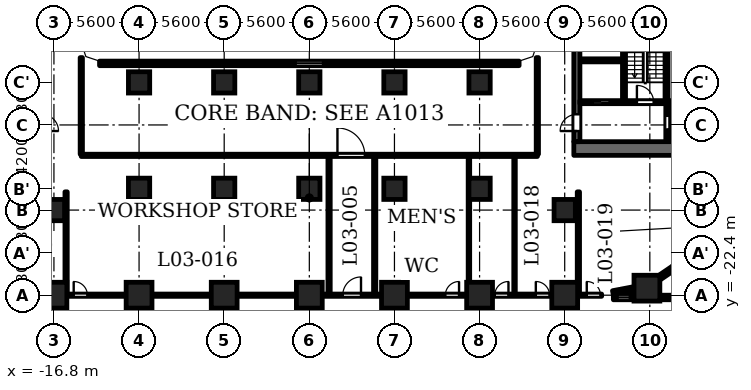
"""IFC4 building model, lengths in metres.
Left out: names, types, materials, properties, quantities, classifications, styles, units other than length and angle.
Written with IfcOpenShell. Run it as: python <this file> out.ifc"""

import sys

from ifc_helpers import new_model, si_unit, direction, frame, frame_2d, origin, origin_2d, place, context, subcontext, project, spatial, polyline, rectangle, outline, extrude, element, fill, save


model = new_model("IFC4")
c1 = context("Model", 3, precision=1e-05, world=origin(), true_north=direction((0.0, 1.0)))
c2 = subcontext(c1, "Body", "Model", "MODEL_VIEW")
j1 = project(units=[si_unit("LENGTHUNIT", "METRE"), si_unit("PLANEANGLEUNIT", "RADIAN")], contexts=[c1])
p1 = place(None, origin())
s1 = spatial("IfcSite", under=j1, at=p1, CompositionType="ELEMENT")
p2 = place(p1, origin())
s2 = spatial("IfcBuilding", under=s1, at=p2, CompositionType="ELEMENT")
p3 = place(p2, frame((0.0, 0.0, 16.1)))
s3 = spatial("IfcBuildingStorey", under=s2, at=p3, CompositionType="ELEMENT", Elevation=16.1)
for number, where, z_axis, x_axis in (
    (1, (-16.8, -22.4, 0.0), (0.0, 0.0, 1.0), (1.0, 0.0, 0.0)),
    (2, (-11.2, -22.4, 0.0), (0.0, 0.0, 1.0), (1.0, 0.0, 0.0)),
    (3, (-5.6, -22.4, 0.0), (0.0, 0.0, 1.0), (1.0, 0.0, 0.0)),
    (4, (0.0, -22.4, 0.0), (0.0, 0.0, 1.0), (1.0, 0.0, 0.0)),
    (5, (5.6, -22.4, 0.0), (0.0, 0.0, 1.0), (1.0, 0.0, 0.0)),
    (6, (11.2, -22.4, 0.0), (0.0, 0.0, 1.0), (1.0, 0.0, 0.0)),
    (7, (16.8, -22.4, 0.0), (0.0, 0.0, 1.0), (1.0, 0.0, 0.0)),
    (8, (22.209, -21.938, 0.0), (0.0, 0.0, 1.0), (1.0, 0.0, 0.0)),
):
    element("IfcColumn", number, at=place(p3, frame(where, z_axis=z_axis, x_axis=x_axis)), inside=s3, PredefinedType="COLUMN", context=c2, shape_type="SweptSolid", body=[
        extrude(rectangle(XDim=1.7, YDim=1.7, at=origin_2d()), origin(), (0.0, 0.0, 1.0), 4.8),
    ])
for number, where, z_axis, x_axis in (
    (9, (-16.8, -16.8, 0.0), (0.0, 0.0, 1.0), (1.0, 0.0, 0.0)),
    (10, (-11.2, -8.4, 0.0), (0.0, 0.0, 1.0), (1.0, 0.0, 0.0)),
    (11, (-5.6, -8.4, 0.0), (0.0, 0.0, 1.0), (1.0, 0.0, 0.0)),
    (12, (0.0, -8.4, 0.0), (0.0, 0.0, 1.0), (1.0, 0.0, 0.0)),
    (13, (5.6, -8.4, 0.0), (0.0, 0.0, 1.0), (1.0, 0.0, 0.0)),
    (14, (11.2, -8.4, 0.0), (0.0, 0.0, 1.0), (1.0, 0.0, 0.0)),
    (15, (16.8, -16.8, 0.0), (0.0, 0.0, 1.0), (1.0, 0.0, 0.0)),
    (16, (-11.2, -15.4, 0.0), (0.0, 0.0, 1.0), (1.0, 0.0, 0.0)),
    (17, (-5.6, -15.4, 0.0), (0.0, 0.0, 1.0), (1.0, 0.0, 0.0)),
    (18, (0.0, -15.4, 0.0), (0.0, 0.0, 1.0), (1.0, 0.0, 0.0)),
    (19, (5.6, -15.4, 0.0), (0.0, 0.0, 1.0), (1.0, 0.0, 0.0)),
    (20, (11.2, -15.4, 0.0), (0.0, 0.0, 1.0), (1.0, 0.0, 0.0)),
):
    element("IfcColumn", number, at=place(p3, frame(where, z_axis=z_axis, x_axis=x_axis)), inside=s3, PredefinedType="COLUMN", context=c2, shape_type="SweptSolid", body=[
        extrude(rectangle(XDim=1.4, YDim=1.4, at=origin_2d()), origin(), (0.0, 0.0, 1.0), 4.8),
    ])
p4 = place(p3, frame((27.5, -22.55, 0.0), z_axis=(0.0, 0.0, 1.0), x_axis=(-1.0, 0.0, 0.0)))
e21 = element("IfcWall", 21, at=p4, inside=s3, PredefinedType="SOLIDWALL", context=c2, shape_type="SweptSolid", body=[
    extrude(rectangle(XDim=4.441, YDim=0.3, at=frame_2d((2.221, 0.0))), origin(), (0.0, 0.0, 1.0), 4.45),
])
p5 = place(p4, frame((0.921, 0.0, 0.9)))
e22 = element("IfcOpeningElement", 22, at=p5, cuts=e21, PredefinedType="OPENING", context=c2, shape_type="SweptSolid", body=[
    extrude(rectangle(XDim=2.6, YDim=1.25, at=frame_2d((1.3, 0.625))), frame((0.0, 0.16, 0.0), z_axis=(0.0, -1.0, 0.0), x_axis=(1.0, 0.0, 0.0)), (0.0, 0.0, 1.0), 0.32),
])
p6 = place(p3, frame((21.359, -22.55, 0.0), z_axis=(0.0, 0.0, 1.0), x_axis=(-1.0, 0.0, 0.0)))
e23 = element("IfcWall", 23, at=p6, inside=s3, PredefinedType="SOLIDWALL", context=c2, shape_type="SweptSolid", body=[
    extrude(rectangle(XDim=1.359, YDim=0.3, at=frame_2d((0.679, 0.0))), origin(), (0.0, 0.0, 1.0), 3.55),
])
p7 = place(p6, frame((0.279, 0.0, 0.6)))
e24 = element("IfcOpeningElement", 24, at=p7, cuts=e23, PredefinedType="OPENING", context=c2, shape_type="SweptSolid", body=[
    extrude(rectangle(XDim=0.8, YDim=1.55, at=frame_2d((0.4, 0.775))), frame((0.0, 0.16, 0.0), z_axis=(0.0, -1.0, 0.0), x_axis=(1.0, 0.0, 0.0)), (0.0, 0.0, 1.0), 0.32),
])
for number, where, z_axis, x_axis in (
    (25, (19.972, -22.253, 0.0), (0.0, 0.0, 1.0), (0.982, 0.187, 0.0)),
    (26, (22.85, -21.369, 0.0), (0.0, 0.0, 1.0), (0.827, 0.562, 0.0)),
):
    element("IfcWall", number, at=place(p3, frame(where, z_axis=z_axis, x_axis=x_axis)), inside=s3, PredefinedType="SOLIDWALL", context=c2, shape_type="SweptSolid", body=[
        extrude(rectangle(XDim=1.406, YDim=0.3, at=frame_2d((0.703, 0.0))), origin(), (0.0, 0.0, 1.0), 3.55),
    ])
p8 = place(p3, frame((13.8, -7.15, 0.0), z_axis=(0.0, 0.0, 1.0), x_axis=(-1.0, 0.0, 0.0)))
e27 = element("IfcWall", 27, at=p8, inside=s3, PredefinedType="SOLIDWALL", context=c2, shape_type="SweptSolid", body=[
    extrude(rectangle(XDim=27.6, YDim=0.3, at=frame_2d((13.8, 0.0))), origin(), (0.0, 0.0, 1.0), 4.45),
])
p9 = place(p8, frame((12.9, 0.0, 0.9)))
e28 = element("IfcOpeningElement", 28, at=p9, cuts=e27, PredefinedType="OPENING", context=c2, shape_type="SweptSolid", body=[
    extrude(rectangle(XDim=1.8, YDim=1.25, at=frame_2d((0.9, 0.625))), frame((0.0, 0.16, 0.0), z_axis=(0.0, -1.0, 0.0), x_axis=(1.0, 0.0, 0.0)), (0.0, 0.0, 1.0), 0.32),
])
p10 = place(p3, frame((20.7, -9.6, 0.0), z_axis=(0.0, 0.0, 1.0), x_axis=(0.0, 1.0, 0.0)))
e29 = element("IfcWall", 29, at=p10, inside=s3, PredefinedType="SHEAR", context=c2, shape_type="SweptSolid", body=[
    extrude(rectangle(XDim=9.75, YDim=0.2, at=frame_2d((4.875, 0.0))), origin(), (0.0, 0.0, 1.0), 4.45),
])
p11 = place(p3, frame((17.4, -12.75, 0.0), z_axis=(0.0, 0.0, 1.0), x_axis=(1.0, 0.0, 0.0)))
e30 = element("IfcWall", 30, at=p11, inside=s3, PredefinedType="SHEAR", context=c2, shape_type="SweptSolid", body=[
    extrude(rectangle(XDim=10.4, YDim=0.9, at=frame_2d((5.2, 0.0))), origin(), (0.0, 0.0, 1.0), 4.45),
])
p12 = place(p3, frame((17.6, -12.3, 0.0), z_axis=(0.0, 0.0, 1.0), x_axis=(0.0, 1.0, 0.0)))
e31 = element("IfcWall", 31, at=p12, inside=s3, PredefinedType="SHEAR", context=c2, shape_type="SweptSolid", body=[
    extrude(rectangle(XDim=24.6, YDim=0.4, at=frame_2d((12.3, 0.0))), origin(), (0.0, 0.0, 1.0), 4.45),
])
p13 = place(p12, frame((6.0, 0.0, 0.0)))
e32 = element("IfcOpeningElement", 32, at=p13, cuts=e31, PredefinedType="OPENING", context=c2, shape_type="SweptSolid", body=[
    extrude(rectangle(XDim=1.1, YDim=2.1, at=frame_2d((0.55, 1.05))), frame((0.0, 0.21, 0.0), z_axis=(0.0, -1.0, 0.0), x_axis=(1.0, 0.0, 0.0)), (0.0, 0.0, 1.0), 0.42),
])
p14 = place(p12, frame((8.4, 0.0, 0.0)))
e33 = element("IfcOpeningElement", 33, at=p14, cuts=e31, PredefinedType="OPENING", context=c2, shape_type="SweptSolid", body=[
    extrude(rectangle(XDim=1.1, YDim=2.1, at=frame_2d((0.55, 1.05))), frame((0.0, 0.21, 0.0), z_axis=(0.0, -1.0, 0.0), x_axis=(1.0, 0.0, 0.0)), (0.0, 0.0, 1.0), 0.42),
])
p15 = place(p12, frame((10.8, 0.0, 0.0)))
e34 = element("IfcOpeningElement", 34, at=p15, cuts=e31, PredefinedType="OPENING", context=c2, shape_type="SweptSolid", body=[
    extrude(rectangle(XDim=1.1, YDim=2.1, at=frame_2d((0.55, 1.05))), frame((0.0, 0.21, 0.0), z_axis=(0.0, -1.0, 0.0), x_axis=(1.0, 0.0, 0.0)), (0.0, 0.0, 1.0), 0.42),
])
p16 = place(p12, frame((16.75, 0.0, 0.0)))
e35 = element("IfcOpeningElement", 35, at=p16, cuts=e31, PredefinedType="OPENING", context=c2, shape_type="SweptSolid", body=[
    extrude(rectangle(XDim=0.9, YDim=2.1, at=frame_2d((0.45, 1.05))), frame((0.0, 0.21, 0.0), z_axis=(0.0, -1.0, 0.0), x_axis=(1.0, 0.0, 0.0)), (0.0, 0.0, 1.0), 0.42),
])
p17 = place(p12, frame((22.8, 0.0, 0.0)))
e36 = element("IfcOpeningElement", 36, at=p17, cuts=e31, PredefinedType="OPENING", context=c2, shape_type="SweptSolid", body=[
    extrude(rectangle(XDim=1.1, YDim=2.1, at=frame_2d((0.55, 1.05))), frame((0.0, 0.21, 0.0), z_axis=(0.0, -1.0, 0.0), x_axis=(1.0, 0.0, 0.0)), (0.0, 0.0, 1.0), 0.42),
])
p18 = place(p12, frame((0.7, 0.0, 0.0)))
e37 = element("IfcOpeningElement", 37, at=p18, cuts=e31, PredefinedType="OPENING", context=c2, shape_type="SweptSolid", body=[
    extrude(rectangle(XDim=1.1, YDim=2.1, at=frame_2d((0.55, 1.05))), frame((0.0, 0.21, 0.0), z_axis=(0.0, -1.0, 0.0), x_axis=(1.0, 0.0, 0.0)), (0.0, 0.0, 1.0), 0.42),
])
p19 = place(p12, frame((12.775, 0.0, 0.0)))
e38 = element("IfcOpeningElement", 38, at=p19, cuts=e31, PredefinedType="OPENING", context=c2, shape_type="SweptSolid", body=[
    extrude(rectangle(XDim=1.8, YDim=2.1, at=frame_2d((0.9, 1.05))), frame((0.0, 0.21, 0.0), z_axis=(0.0, -1.0, 0.0), x_axis=(1.0, 0.0, 0.0)), (0.0, 0.0, 1.0), 0.42),
])
p20 = place(p3, frame((23.55, -12.3, 0.0), z_axis=(0.0, 0.0, 1.0), x_axis=(0.0, 1.0, 0.0)))
e39 = element("IfcWall", 39, at=p20, inside=s3, PredefinedType="PARTITIONING", context=c2, shape_type="SweptSolid", body=[
    extrude(rectangle(XDim=2.5, YDim=0.2, at=frame_2d((1.25, 0.0))), origin(), (0.0, 0.0, 1.0), 4.45),
])
p21 = place(p20, frame((0.8, 0.0, 0.0)))
e40 = element("IfcOpeningElement", 40, at=p21, cuts=e39, PredefinedType="OPENING", context=c2, shape_type="SweptSolid", body=[
    extrude(rectangle(XDim=0.9, YDim=2.1, at=frame_2d((0.45, 1.05))), frame((0.0, 0.11, 0.0), z_axis=(0.0, -1.0, 0.0), x_axis=(1.0, 0.0, 0.0)), (0.0, 0.0, 1.0), 0.22),
])
p22 = place(p3, frame((17.8, -9.7, 0.0), z_axis=(0.0, 0.0, 1.0), x_axis=(1.0, 0.0, 0.0)))
e41 = element("IfcWall", 41, at=p22, inside=s3, PredefinedType="SHEAR", context=c2, shape_type="SweptSolid", body=[
    extrude(rectangle(XDim=8.3, YDim=0.2, at=frame_2d((4.15, 0.0))), origin(), (0.0, 0.0, 1.0), 4.45),
])
p23 = place(p22, frame((0.85, 0.0, 0.0)))
e42 = element("IfcOpeningElement", 42, at=p23, cuts=e41, PredefinedType="OPENING", context=c2, shape_type="SweptSolid", body=[
    extrude(rectangle(XDim=1.1, YDim=2.1, at=frame_2d((0.55, 1.05))), frame((0.0, 0.11, 0.0), z_axis=(0.0, -1.0, 0.0), x_axis=(1.0, 0.0, 0.0)), (0.0, 0.0, 1.0), 0.22),
])
p24 = place(p22, frame((3.75, 0.0, 0.0)))
e43 = element("IfcOpeningElement", 43, at=p24, cuts=e41, PredefinedType="OPENING", context=c2, shape_type="SweptSolid", body=[
    extrude(rectangle(XDim=1.1, YDim=2.1, at=frame_2d((0.55, 1.05))), frame((0.0, 0.11, 0.0), z_axis=(0.0, -1.0, 0.0), x_axis=(1.0, 0.0, 0.0)), (0.0, 0.0, 1.0), 0.22),
])
p25 = place(p3, frame((17.8, -6.95, 0.0), z_axis=(0.0, 0.0, 1.0), x_axis=(1.0, 0.0, 0.0)))
e44 = element("IfcWall", 44, at=p25, inside=s3, PredefinedType="PARTITIONING", context=c2, shape_type="SweptSolid", body=[
    extrude(rectangle(XDim=2.8, YDim=0.2, at=frame_2d((1.4, 0.0))), origin(), (0.0, 0.0, 1.0), 4.45),
])
p26 = place(p3, frame((23.5, -9.6, 0.0), z_axis=(0.0, 0.0, 1.0), x_axis=(0.0, 1.0, 0.0)))
e45 = element("IfcWall", 45, at=p26, inside=s3, PredefinedType="SHEAR", context=c2, shape_type="SweptSolid", body=[
    extrude(rectangle(XDim=6.9, YDim=0.2, at=frame_2d((3.45, 0.0))), origin(), (0.0, 0.0, 1.0), 4.45),
])
p27 = place(p3, frame((-18.98, -22.4, 0.0), z_axis=(0.0, 0.0, 1.0), x_axis=(1.0, 0.0, 0.0)))
e46 = element("IfcWall", 46, at=p27, inside=s3, PredefinedType="PARTITIONING", context=c2, shape_type="SweptSolid", body=[
    extrude(rectangle(XDim=38.211, YDim=0.15, at=frame_2d((19.105, 0.0))), origin(), (0.0, 0.0, 1.0), 3.55),
])
p28 = place(p27, frame((21.18, 0.0, 0.0)))
e47 = element("IfcOpeningElement", 47, at=p28, cuts=e46, PredefinedType="OPENING", context=c2, shape_type="SweptSolid", body=[
    extrude(rectangle(XDim=1.2, YDim=2.1, at=frame_2d((0.6, 1.05))), frame((0.0, 0.085, 0.0), z_axis=(0.0, -1.0, 0.0), x_axis=(1.0, 0.0, 0.0)), (0.0, 0.0, 1.0), 0.17),
])
p29 = place(p27, frame((0.08, 0.0, 0.0)))
e48 = element("IfcOpeningElement", 48, at=p29, cuts=e46, PredefinedType="OPENING", context=c2, shape_type="SweptSolid", body=[
    extrude(rectangle(XDim=1.0, YDim=2.1, at=frame_2d((0.5, 1.05))), frame((0.0, 0.085, 0.0), z_axis=(0.0, -1.0, 0.0), x_axis=(1.0, 0.0, 0.0)), (0.0, 0.0, 1.0), 0.17),
])
p30 = place(p27, frame((3.48, 0.0, 0.0)))
e49 = element("IfcOpeningElement", 49, at=p30, cuts=e46, PredefinedType="OPENING", context=c2, shape_type="SweptSolid", body=[
    extrude(rectangle(XDim=0.9, YDim=2.1, at=frame_2d((0.45, 1.05))), frame((0.0, 0.085, 0.0), z_axis=(0.0, -1.0, 0.0), x_axis=(1.0, 0.0, 0.0)), (0.0, 0.0, 1.0), 0.17),
])
p31 = place(p27, frame((27.93, 0.0, 0.0)))
e50 = element("IfcOpeningElement", 50, at=p31, cuts=e46, PredefinedType="OPENING", context=c2, shape_type="SweptSolid", body=[
    extrude(rectangle(XDim=0.9, YDim=2.1, at=frame_2d((0.45, 1.05))), frame((0.0, 0.085, 0.0), z_axis=(0.0, -1.0, 0.0), x_axis=(1.0, 0.0, 0.0)), (0.0, 0.0, 1.0), 0.17),
])
p32 = place(p27, frame((31.18, 0.0, 0.0)))
e51 = element("IfcOpeningElement", 51, at=p32, cuts=e46, PredefinedType="OPENING", context=c2, shape_type="SweptSolid", body=[
    extrude(rectangle(XDim=0.9, YDim=2.1, at=frame_2d((0.45, 1.05))), frame((0.0, 0.085, 0.0), z_axis=(0.0, -1.0, 0.0), x_axis=(1.0, 0.0, 0.0)), (0.0, 0.0, 1.0), 0.17),
])
p33 = place(p27, frame((33.88, 0.0, 0.0)))
e52 = element("IfcOpeningElement", 52, at=p33, cuts=e46, PredefinedType="OPENING", context=c2, shape_type="SweptSolid", body=[
    extrude(rectangle(XDim=0.9, YDim=2.1, at=frame_2d((0.45, 1.05))), frame((0.0, 0.085, 0.0), z_axis=(0.0, -1.0, 0.0), x_axis=(1.0, 0.0, 0.0)), (0.0, 0.0, 1.0), 0.17),
])
p34 = place(p27, frame((37.231, 0.0, 0.0)))
e53 = element("IfcOpeningElement", 53, at=p34, cuts=e46, PredefinedType="OPENING", context=c2, shape_type="SweptSolid", body=[
    extrude(rectangle(XDim=0.9, YDim=2.1, at=frame_2d((0.45, 1.05))), frame((0.0, 0.085, 0.0), z_axis=(0.0, -1.0, 0.0), x_axis=(1.0, 0.0, 0.0)), (0.0, 0.0, 1.0), 0.17),
])
p35 = place(p3, frame((-15.005, -13.2, 0.0), z_axis=(0.0, 0.0, 1.0), x_axis=(1.0, 0.0, 0.0)))
e54 = element("IfcWall", 54, at=p35, inside=s3, PredefinedType="PARTITIONING", context=c2, shape_type="SweptSolid", body=[
    extrude(rectangle(XDim=30.01, YDim=0.15, at=frame_2d((15.005, 0.0))), origin(), (0.0, 0.0, 1.0), 4.45),
])
p36 = place(p35, frame((16.855, 0.0, 0.0)))
e55 = element("IfcOpeningElement", 55, at=p36, cuts=e54, PredefinedType="OPENING", context=c2, shape_type="SweptSolid", body=[
    extrude(rectangle(XDim=1.8, YDim=2.1, at=frame_2d((0.9, 1.05))), frame((0.0, 0.085, 0.0), z_axis=(0.0, -1.0, 0.0), x_axis=(1.0, 0.0, 0.0)), (0.0, 0.0, 1.0), 0.17),
])
p37 = place(p3, frame((-16.0, -22.325, 0.0), z_axis=(0.0, 0.0, 1.0), x_axis=(0.0, 1.0, 0.0)))
e56 = element("IfcWall", 56, at=p37, inside=s3, PredefinedType="PARTITIONING", context=c2, shape_type="SweptSolid", body=[
    extrude(rectangle(XDim=6.725, YDim=0.15, at=frame_2d((3.362, 0.0))), origin(), (0.0, 0.0, 1.0), 4.45),
])
p38 = place(p3, frame((-15.0, -13.125, 0.0), z_axis=(0.0, 0.0, 1.0), x_axis=(0.0, 1.0, 0.0)))
e57 = element("IfcWall", 57, at=p38, inside=s3, PredefinedType="PARTITIONING", context=c2, shape_type="SweptSolid", body=[
    extrude(rectangle(XDim=6.356, YDim=0.15, at=frame_2d((3.178, 0.0))), origin(), (0.0, 0.0, 1.0), 4.45),
])
for number, where, z_axis, x_axis in (
    (58, (1.3, -22.325, 0.0), (0.0, 0.0, 1.0), (0.0, 1.0, 0.0)),
    (59, (4.3, -22.325, 0.0), (0.0, 0.0, 1.0), (0.0, 1.0, 0.0)),
):
    element("IfcWall", number, at=place(p3, frame(where, z_axis=z_axis, x_axis=x_axis)), inside=s3, PredefinedType="PARTITIONING", context=c2, shape_type="SweptSolid", body=[
        extrude(rectangle(XDim=9.05, YDim=0.15, at=frame_2d((4.525, 0.0))), origin(), (0.0, 0.0, 1.0), 4.45),
    ])
for number, where, z_axis, x_axis in (
    (60, (10.5, -22.325, 0.0), (0.0, 0.0, 1.0), (0.0, 1.0, 0.0)),
    (61, (13.5, -22.325, 0.0), (0.0, 0.0, 1.0), (0.0, 1.0, 0.0)),
):
    element("IfcWall", number, at=place(p3, frame(where, z_axis=z_axis, x_axis=x_axis)), inside=s3, PredefinedType="PARTITIONING", context=c2, shape_type="SweptSolid", body=[
        extrude(rectangle(XDim=9.05, YDim=0.1, at=frame_2d((4.525, 0.0))), origin(), (0.0, 0.0, 1.0), 4.45),
    ])
p39 = place(p3, frame((15.0, -13.125, 0.0), z_axis=(0.0, 0.0, 1.0), x_axis=(0.0, 1.0, 0.0)))
e62 = element("IfcWall", 62, at=p39, inside=s3, PredefinedType="PARTITIONING", context=c2, shape_type="SweptSolid", body=[
    extrude(rectangle(XDim=6.356, YDim=0.15, at=frame_2d((3.178, 0.0))), origin(), (0.0, 0.0, 1.0), 4.45),
])
p40 = place(p3, frame((17.7, -22.325, 0.0), z_axis=(0.0, 0.0, 1.0), x_axis=(0.0, 1.0, 0.0)))
e63 = element("IfcWall", 63, at=p40, inside=s3, PredefinedType="PARTITIONING", context=c2, shape_type="SweptSolid", body=[
    extrude(rectangle(XDim=6.725, YDim=0.15, at=frame_2d((3.362, 0.0))), origin(), (0.0, 0.0, 1.0), 4.45),
])
p41 = place(p3, origin())
e64 = element("IfcWall", 64, at=p41, inside=s3, PredefinedType="SOLIDWALL", context=c2, shape_type="SweptSolid", body=[
    extrude(outline(polyline([(19.944, -22.105), (19.251, -22.238), (19.251, -22.7), (20.0, -22.7), (20.0, -22.4), (19.944, -22.105)])), origin(), (0.0, 0.0, 1.0), 3.55),
])
e65 = element("IfcWall", 65, at=p41, inside=s3, PredefinedType="SOLIDWALL", context=c2, shape_type="SweptSolid", body=[
    extrude(outline(polyline([(14.937, -6.937), (15.3, -5.849), (15.3, -5.8), (15.0, -5.8), (14.7, -6.7), (13.8, -7.0), (13.8, -7.3), (13.849, -7.3), (14.937, -6.937)])), origin(), (0.0, 0.0, 1.0), 4.45),
])
e66 = element("IfcWall", 66, at=p41, inside=s3, PredefinedType="SOLIDWALL", context=c2, shape_type="SweptSolid", body=[
    extrude(outline(polyline([(-14.937, -6.937), (-13.849, -7.3), (-13.8, -7.3), (-13.8, -7.0), (-14.7, -6.7), (-15.0, -5.8), (-15.3, -5.8), (-15.3, -5.849), (-14.937, -6.937)])), origin(), (0.0, 0.0, 1.0), 4.45),
])
p42 = place(p23, origin())
e67 = element("IfcDoor", 67, at=p42, inside=s3, OperationType="DOUBLE_DOOR_SLIDING", PredefinedType="DOOR", context=c2, shape_type="SweptSolid", body=[
    extrude(rectangle(XDim=1.1, YDim=2.1, at=frame_2d((0.55, 1.05))), frame((0.0, 0.025, 0.0), z_axis=(0.0, -1.0, 0.0), x_axis=(1.0, 0.0, 0.0)), (0.0, 0.0, 1.0), 0.05),
])
fill(e42, e67)
p43 = place(p18, origin())
e68 = element("IfcDoor", 68, at=p43, inside=s3, OperationType="SINGLE_SWING_RIGHT", PredefinedType="DOOR", context=c2, shape_type="SweptSolid", body=[
    extrude(rectangle(XDim=1.1, YDim=2.1, at=frame_2d((0.55, 1.05))), frame((0.0, 0.025, 0.0), z_axis=(0.0, -1.0, 0.0), x_axis=(1.0, 0.0, 0.0)), (0.0, 0.0, 1.0), 0.05),
])
fill(e37, e68)
p44 = place(p21, origin())
e69 = element("IfcDoor", 69, at=p44, inside=s3, OperationType="SINGLE_SWING_LEFT", PredefinedType="DOOR", context=c2, shape_type="SweptSolid", body=[
    extrude(rectangle(XDim=0.9, YDim=2.1, at=frame_2d((0.45, 1.05))), frame((0.0, 0.025, 0.0), z_axis=(0.0, -1.0, 0.0), x_axis=(1.0, 0.0, 0.0)), (0.0, 0.0, 1.0), 0.05),
])
fill(e40, e69)
p45 = place(p24, origin())
e70 = element("IfcDoor", 70, at=p45, inside=s3, OperationType="SINGLE_SWING_RIGHT", PredefinedType="DOOR", context=c2, shape_type="SweptSolid", body=[
    extrude(rectangle(XDim=1.1, YDim=2.1, at=frame_2d((0.55, 1.05))), frame((0.0, 0.025, 0.0), z_axis=(0.0, -1.0, 0.0), x_axis=(1.0, 0.0, 0.0)), (0.0, 0.0, 1.0), 0.05),
])
fill(e43, e70)
p46 = place(p36, origin())
e71 = element("IfcDoor", 71, at=p46, inside=s3, OperationType="SINGLE_SWING_RIGHT", PredefinedType="DOOR", context=c2, shape_type="SweptSolid", body=[
    extrude(rectangle(XDim=1.8, YDim=2.1, at=frame_2d((0.9, 1.05))), frame((0.0, 0.025, 0.0), z_axis=(0.0, -1.0, 0.0), x_axis=(1.0, 0.0, 0.0)), (0.0, 0.0, 1.0), 0.05),
])
fill(e55, e71)
p47 = place(p28, origin())
e72 = element("IfcDoor", 72, at=p47, inside=s3, OperationType="SINGLE_SWING_LEFT", PredefinedType="DOOR", context=c2, shape_type="SweptSolid", body=[
    extrude(rectangle(XDim=1.2, YDim=2.1, at=frame_2d((0.6, 1.05))), frame((0.0, 0.025, 0.0), z_axis=(0.0, -1.0, 0.0), x_axis=(1.0, 0.0, 0.0)), (0.0, 0.0, 1.0), 0.05),
])
fill(e47, e72)
p48 = place(p30, origin())
e73 = element("IfcDoor", 73, at=p48, inside=s3, OperationType="SINGLE_SWING_RIGHT", PredefinedType="DOOR", context=c2, shape_type="SweptSolid", body=[
    extrude(rectangle(XDim=0.9, YDim=2.1, at=frame_2d((0.45, 1.05))), frame((0.0, 0.025, 0.0), z_axis=(0.0, -1.0, 0.0), x_axis=(1.0, 0.0, 0.0)), (0.0, 0.0, 1.0), 0.05),
])
fill(e49, e73)
p49 = place(p31, origin())
e74 = element("IfcDoor", 74, at=p49, inside=s3, OperationType="SINGLE_SWING_LEFT", PredefinedType="DOOR", context=c2, shape_type="SweptSolid", body=[
    extrude(rectangle(XDim=0.9, YDim=2.1, at=frame_2d((0.45, 1.05))), frame((0.0, 0.025, 0.0), z_axis=(0.0, -1.0, 0.0), x_axis=(1.0, 0.0, 0.0)), (0.0, 0.0, 1.0), 0.05),
])
fill(e50, e74)
p50 = place(p32, origin())
e75 = element("IfcDoor", 75, at=p50, inside=s3, OperationType="SINGLE_SWING_LEFT", PredefinedType="DOOR", context=c2, shape_type="SweptSolid", body=[
    extrude(rectangle(XDim=0.9, YDim=2.1, at=frame_2d((0.45, 1.05))), frame((0.0, 0.025, 0.0), z_axis=(0.0, -1.0, 0.0), x_axis=(1.0, 0.0, 0.0)), (0.0, 0.0, 1.0), 0.05),
])
fill(e51, e75)
p51 = place(p33, origin())
e76 = element("IfcDoor", 76, at=p51, inside=s3, OperationType="SINGLE_SWING_RIGHT", PredefinedType="DOOR", context=c2, shape_type="SweptSolid", body=[
    extrude(rectangle(XDim=0.9, YDim=2.1, at=frame_2d((0.45, 1.05))), frame((0.0, 0.025, 0.0), z_axis=(0.0, -1.0, 0.0), x_axis=(1.0, 0.0, 0.0)), (0.0, 0.0, 1.0), 0.05),
])
fill(e52, e76)
p52 = place(p34, origin())
e77 = element("IfcDoor", 77, at=p52, inside=s3, OperationType="SINGLE_SWING_RIGHT", PredefinedType="DOOR", context=c2, shape_type="SweptSolid", body=[
    extrude(rectangle(XDim=0.9, YDim=2.1, at=frame_2d((0.45, 1.05))), frame((0.0, 0.025, 0.0), z_axis=(0.0, -1.0, 0.0), x_axis=(1.0, 0.0, 0.0)), (0.0, 0.0, 1.0), 0.05),
])
fill(e53, e77)
p53 = place(p7, origin())
e78 = element("IfcWindow", 78, at=p53, inside=s3, PartitioningType="SINGLE_PANEL", PredefinedType="WINDOW", context=c2, shape_type="SweptSolid", body=[
    extrude(rectangle(XDim=0.8, YDim=1.55, at=frame_2d((0.4, 0.775))), frame((0.0, 0.03, 0.0), z_axis=(0.0, -1.0, 0.0), x_axis=(1.0, 0.0, 0.0)), (0.0, 0.0, 1.0), 0.06),
])
fill(e24, e78)
p54 = place(p9, origin())
e79 = element("IfcWindow", 79, at=p54, inside=s3, PartitioningType="SINGLE_PANEL", PredefinedType="WINDOW", context=c2, shape_type="SweptSolid", body=[
    extrude(rectangle(XDim=1.8, YDim=1.25, at=frame_2d((0.9, 0.625))), frame((0.0, 0.03, 0.0), z_axis=(0.0, -1.0, 0.0), x_axis=(1.0, 0.0, 0.0)), (0.0, 0.0, 1.0), 0.06),
])
fill(e28, e79)
save(model, sys.argv[1])
